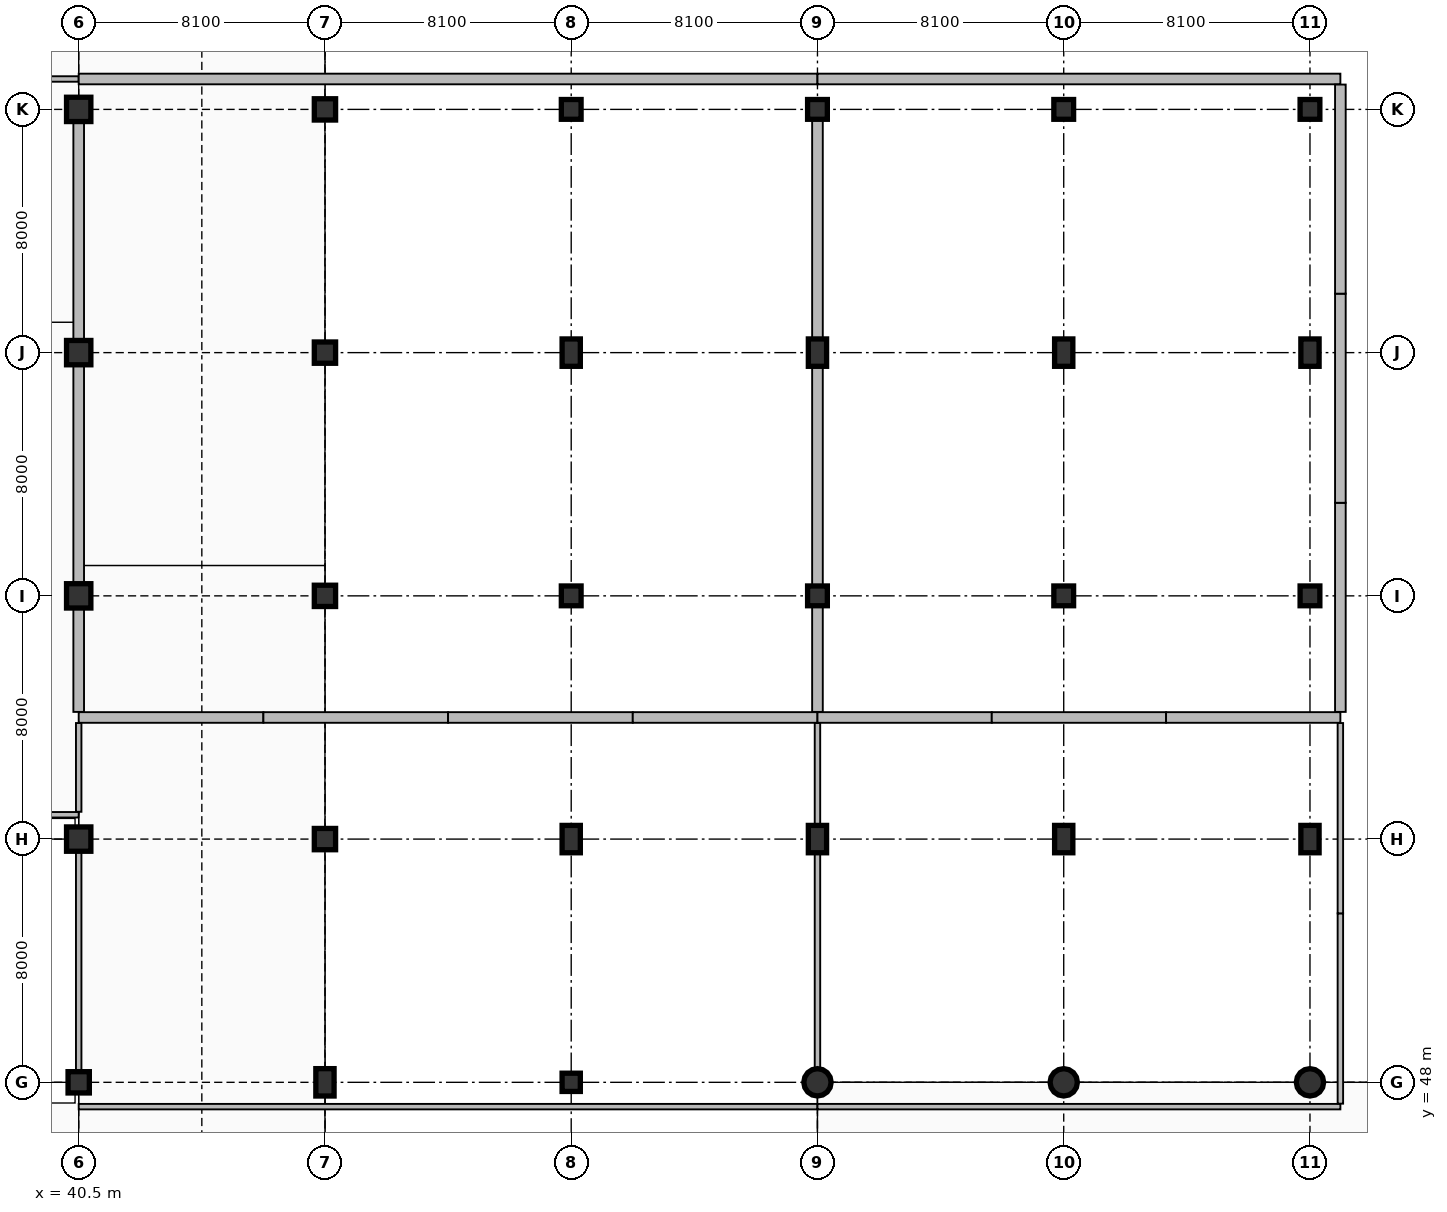
"""IFC4 building model, lengths in metres.
Left out: names, types, materials, properties, quantities, classifications, styles, units other than length and angle.
Written with IfcOpenShell. Run it as: python <this file> out.ifc"""

import sys

from ifc_helpers import new_model, si_unit, direction, frame, frame_2d, origin, origin_2d, place, context, subcontext, project, spatial, rectangle, circle, extrude, element, fill, save


model = new_model("IFC4")
c1 = context("Model", 3, precision=1e-05, world=origin(), true_north=direction((0.0, 1.0)))
c2 = subcontext(c1, "Body", "Model", "MODEL_VIEW")
j1 = project(units=[si_unit("LENGTHUNIT", "METRE"), si_unit("PLANEANGLEUNIT", "RADIAN")], contexts=[c1])
p1 = place(None, origin())
s1 = spatial("IfcSite", under=j1, at=p1, CompositionType="ELEMENT")
p2 = place(p1, origin())
s2 = spatial("IfcBuilding", under=s1, at=p2, CompositionType="ELEMENT")
p3 = place(p2, frame((0.0, 0.0, -4.8)))
s3 = spatial("IfcBuildingStorey", under=s2, at=p3, CompositionType="ELEMENT", Elevation=-4.8)
p4 = place(p3, frame((40.5, 48.0, 0.0), z_axis=(0.0, 0.0, 1.0), x_axis=(1.0, 0.0, 0.0)))
e1 = element("IfcColumn", 1, at=p4, inside=s3, PredefinedType="COLUMN", context=c2, shape_type="SweptSolid", body=[
    extrude(rectangle(XDim=0.7, YDim=0.7, at=origin_2d()), origin(), (0.0, 0.0, 1.0), 4.8),
])
for number, where, z_axis, x_axis in (
    (2, (40.5, 56.0, 0.0), (0.0, 0.0, 1.0), (1.0, 0.0, 0.0)),
    (3, (40.5, 64.0, 0.0), (0.0, 0.0, 1.0), (1.0, 0.0, 0.0)),
    (4, (40.5, 72.0, 0.0), (0.0, 0.0, 1.0), (1.0, 0.0, 0.0)),
    (5, (40.5, 80.0, 0.0), (0.0, 0.0, 1.0), (1.0, 0.0, 0.0)),
):
    element("IfcColumn", number, at=place(p3, frame(where, z_axis=z_axis, x_axis=x_axis)), inside=s3, PredefinedType="COLUMN", context=c2, shape_type="SweptSolid", body=[
        extrude(rectangle(XDim=0.8, YDim=0.8, at=origin_2d()), origin(), (0.0, 0.0, 1.0), 4.8),
    ])
p5 = place(p3, frame((48.6, 48.0, 0.0), z_axis=(0.0, 0.0, 1.0), x_axis=(1.0, 0.0, 0.0)))
e6 = element("IfcColumn", 6, at=p5, inside=s3, PredefinedType="COLUMN", context=c2, shape_type="SweptSolid", body=[
    extrude(rectangle(XDim=0.6, YDim=0.9, at=origin_2d()), origin(), (0.0, 0.0, 1.0), 4.8),
])
for number, where, z_axis, x_axis in (
    (7, (48.6, 56.0, 0.0), (0.0, 0.0, 1.0), (1.0, 0.0, 0.0)),
    (8, (48.6, 64.0, 0.0), (0.0, 0.0, 1.0), (1.0, 0.0, 0.0)),
    (9, (48.6, 72.0, 0.0), (0.0, 0.0, 1.0), (1.0, 0.0, 0.0)),
    (10, (48.6, 80.0, 0.0), (0.0, 0.0, 1.0), (1.0, 0.0, 0.0)),
):
    element("IfcColumn", number, at=place(p3, frame(where, z_axis=z_axis, x_axis=x_axis)), inside=s3, PredefinedType="COLUMN", context=c2, shape_type="SweptSolid", body=[
        extrude(rectangle(XDim=0.7, YDim=0.7, at=origin_2d()), origin(), (0.0, 0.0, 1.0), 4.8),
    ])
p6 = place(p3, frame((56.7, 48.0, 0.0), z_axis=(0.0, 0.0, 1.0), x_axis=(1.0, 0.0, 0.0)))
e11 = element("IfcColumn", 11, at=p6, inside=s3, PredefinedType="COLUMN", context=c2, shape_type="SweptSolid", body=[
    extrude(rectangle(XDim=0.6, YDim=0.6, at=origin_2d()), origin(), (0.0, 0.0, 1.0), 4.45),
])
p7 = place(p3, frame((56.7, 56.0, 0.0), z_axis=(0.0, 0.0, 1.0), x_axis=(1.0, 0.0, 0.0)))
e12 = element("IfcColumn", 12, at=p7, inside=s3, PredefinedType="COLUMN", context=c2, shape_type="SweptSolid", body=[
    extrude(rectangle(XDim=0.6, YDim=0.9, at=origin_2d()), origin(), (0.0, 0.0, 1.0), 4.8),
])
p8 = place(p3, frame((56.7, 64.0, 0.0), z_axis=(0.0, 0.0, 1.0), x_axis=(1.0, 0.0, 0.0)))
e13 = element("IfcColumn", 13, at=p8, inside=s3, PredefinedType="COLUMN", context=c2, shape_type="SweptSolid", body=[
    extrude(rectangle(XDim=0.65, YDim=0.65, at=origin_2d()), origin(), (0.0, 0.0, 1.0), 4.8),
])
p9 = place(p3, frame((56.7, 72.0, 0.0), z_axis=(0.0, 0.0, 1.0), x_axis=(1.0, 0.0, 0.0)))
e14 = element("IfcColumn", 14, at=p9, inside=s3, PredefinedType="COLUMN", context=c2, shape_type="SweptSolid", body=[
    extrude(rectangle(XDim=0.6, YDim=0.9, at=origin_2d()), origin(), (0.0, 0.0, 1.0), 4.8),
])
p10 = place(p3, frame((56.7, 80.0, 0.0), z_axis=(0.0, 0.0, 1.0), x_axis=(1.0, 0.0, 0.0)))
e15 = element("IfcColumn", 15, at=p10, inside=s3, PredefinedType="COLUMN", context=c2, shape_type="SweptSolid", body=[
    extrude(rectangle(XDim=0.65, YDim=0.65, at=origin_2d()), origin(), (0.0, 0.0, 1.0), 4.8),
])
p11 = place(p3, frame((64.8, 48.0, 0.0), z_axis=(0.0, 0.0, 1.0), x_axis=(1.0, 0.0, 0.0)))
e16 = element("IfcColumn", 16, at=p11, inside=s3, PredefinedType="COLUMN", context=c2, shape_type="SweptSolid", body=[
    extrude(circle(Radius=0.45, at=origin_2d()), origin(), (0.0, 0.0, 1.0), 4.8),
])
p12 = place(p3, frame((64.8, 56.0, 0.0), z_axis=(0.0, 0.0, 1.0), x_axis=(1.0, 0.0, 0.0)))
e17 = element("IfcColumn", 17, at=p12, inside=s3, PredefinedType="COLUMN", context=c2, shape_type="SweptSolid", body=[
    extrude(rectangle(XDim=0.6, YDim=0.9, at=origin_2d()), origin(), (0.0, 0.0, 1.0), 4.8),
])
p13 = place(p3, frame((64.8, 64.0, 0.0), z_axis=(0.0, 0.0, 1.0), x_axis=(1.0, 0.0, 0.0)))
e18 = element("IfcColumn", 18, at=p13, inside=s3, PredefinedType="COLUMN", context=c2, shape_type="SweptSolid", body=[
    extrude(rectangle(XDim=0.65, YDim=0.65, at=origin_2d()), origin(), (0.0, 0.0, 1.0), 4.8),
])
p14 = place(p3, frame((64.8, 72.0, 0.0), z_axis=(0.0, 0.0, 1.0), x_axis=(1.0, 0.0, 0.0)))
e19 = element("IfcColumn", 19, at=p14, inside=s3, PredefinedType="COLUMN", context=c2, shape_type="SweptSolid", body=[
    extrude(rectangle(XDim=0.6, YDim=0.9, at=origin_2d()), origin(), (0.0, 0.0, 1.0), 4.8),
])
p15 = place(p3, frame((64.8, 80.0, 0.0), z_axis=(0.0, 0.0, 1.0), x_axis=(1.0, 0.0, 0.0)))
e20 = element("IfcColumn", 20, at=p15, inside=s3, PredefinedType="COLUMN", context=c2, shape_type="SweptSolid", body=[
    extrude(rectangle(XDim=0.65, YDim=0.65, at=origin_2d()), origin(), (0.0, 0.0, 1.0), 4.8),
])
p16 = place(p3, frame((72.9, 48.0, 0.0), z_axis=(0.0, 0.0, 1.0), x_axis=(1.0, 0.0, 0.0)))
e21 = element("IfcColumn", 21, at=p16, inside=s3, PredefinedType="COLUMN", context=c2, shape_type="SweptSolid", body=[
    extrude(circle(Radius=0.45, at=origin_2d()), origin(), (0.0, 0.0, 1.0), 4.8),
])
p17 = place(p3, frame((72.9, 56.0, 0.0), z_axis=(0.0, 0.0, 1.0), x_axis=(1.0, 0.0, 0.0)))
e22 = element("IfcColumn", 22, at=p17, inside=s3, PredefinedType="COLUMN", context=c2, shape_type="SweptSolid", body=[
    extrude(rectangle(XDim=0.6, YDim=0.9, at=origin_2d()), origin(), (0.0, 0.0, 1.0), 4.8),
])
p18 = place(p3, frame((72.9, 64.0, 0.0), z_axis=(0.0, 0.0, 1.0), x_axis=(1.0, 0.0, 0.0)))
e23 = element("IfcColumn", 23, at=p18, inside=s3, PredefinedType="COLUMN", context=c2, shape_type="SweptSolid", body=[
    extrude(rectangle(XDim=0.65, YDim=0.65, at=origin_2d()), origin(), (0.0, 0.0, 1.0), 4.8),
])
p19 = place(p3, frame((72.9, 72.0, 0.0), z_axis=(0.0, 0.0, 1.0), x_axis=(1.0, 0.0, 0.0)))
e24 = element("IfcColumn", 24, at=p19, inside=s3, PredefinedType="COLUMN", context=c2, shape_type="SweptSolid", body=[
    extrude(rectangle(XDim=0.6, YDim=0.9, at=origin_2d()), origin(), (0.0, 0.0, 1.0), 4.8),
])
p20 = place(p3, frame((72.9, 80.0, 0.0), z_axis=(0.0, 0.0, 1.0), x_axis=(1.0, 0.0, 0.0)))
e25 = element("IfcColumn", 25, at=p20, inside=s3, PredefinedType="COLUMN", context=c2, shape_type="SweptSolid", body=[
    extrude(rectangle(XDim=0.65, YDim=0.65, at=origin_2d()), origin(), (0.0, 0.0, 1.0), 4.8),
])
p21 = place(p3, frame((81.0, 48.0, 0.0), z_axis=(0.0, 0.0, 1.0), x_axis=(1.0, 0.0, 0.0)))
e26 = element("IfcColumn", 26, at=p21, inside=s3, PredefinedType="COLUMN", context=c2, shape_type="SweptSolid", body=[
    extrude(circle(Radius=0.45, at=origin_2d()), origin(), (0.0, 0.0, 1.0), 4.8),
])
p22 = place(p3, frame((81.0, 56.0, 0.0), z_axis=(0.0, 0.0, 1.0), x_axis=(1.0, 0.0, 0.0)))
e27 = element("IfcColumn", 27, at=p22, inside=s3, PredefinedType="COLUMN", context=c2, shape_type="SweptSolid", body=[
    extrude(rectangle(XDim=0.6, YDim=0.9, at=origin_2d()), origin(), (0.0, 0.0, 1.0), 4.8),
])
p23 = place(p3, frame((81.0, 64.0, 0.0), z_axis=(0.0, 0.0, 1.0), x_axis=(1.0, 0.0, 0.0)))
e28 = element("IfcColumn", 28, at=p23, inside=s3, PredefinedType="COLUMN", context=c2, shape_type="SweptSolid", body=[
    extrude(rectangle(XDim=0.65, YDim=0.65, at=origin_2d()), origin(), (0.0, 0.0, 1.0), 4.8),
])
p24 = place(p3, frame((81.0, 72.0, 0.0), z_axis=(0.0, 0.0, 1.0), x_axis=(1.0, 0.0, 0.0)))
e29 = element("IfcColumn", 29, at=p24, inside=s3, PredefinedType="COLUMN", context=c2, shape_type="SweptSolid", body=[
    extrude(rectangle(XDim=0.6, YDim=0.9, at=origin_2d()), origin(), (0.0, 0.0, 1.0), 4.8),
])
p25 = place(p3, frame((81.0, 80.0, 0.0), z_axis=(0.0, 0.0, 1.0), x_axis=(1.0, 0.0, 0.0)))
e30 = element("IfcColumn", 30, at=p25, inside=s3, PredefinedType="COLUMN", context=c2, shape_type="SweptSolid", body=[
    extrude(rectangle(XDim=0.65, YDim=0.65, at=origin_2d()), origin(), (0.0, 0.0, 1.0), 4.8),
])
p26 = place(p3, frame((36.2, 56.8, 0.0), z_axis=(0.0, 0.0, 1.0), x_axis=(1.0, 0.0, 0.0)))
e31 = element("IfcWall", 31, at=p26, inside=s3, PredefinedType="PARTITIONING", context=c2, shape_type="SweptSolid", body=[
    extrude(rectangle(XDim=4.3, YDim=0.18, at=frame_2d((2.15, 0.0))), origin(), (0.0, 0.0, 1.0), 4.45),
])
p27 = place(p3, frame((36.2, 81.0, 0.0), z_axis=(0.0, 0.0, 1.0), x_axis=(1.0, 0.0, 0.0)))
e32 = element("IfcWall", 32, at=p27, inside=s3, PredefinedType="PARTITIONING", context=c2, shape_type="SweptSolid", body=[
    extrude(rectangle(XDim=4.3, YDim=0.18, at=frame_2d((2.15, 0.0))), origin(), (0.0, 0.0, 1.0), 4.45),
])
p28 = place(p27, frame((1.55, 0.0, 0.0)))
e33 = element("IfcOpeningElement", 33, at=p28, cuts=e32, PredefinedType="OPENING", context=c2, shape_type="SweptSolid", body=[
    extrude(rectangle(XDim=1.2, YDim=2.2, at=frame_2d((0.6, 1.1))), frame((0.0, 0.1, 0.0), z_axis=(0.0, -1.0, 0.0), x_axis=(1.0, 0.0, 0.0)), (0.0, 0.0, 1.0), 0.2),
])
p29 = place(p3, frame((40.5, 47.2, 0.0), z_axis=(0.0, 0.0, 1.0), x_axis=(1.0, 0.0, 0.0)))
e34 = element("IfcWall", 34, at=p29, inside=s3, PredefinedType="PARTITIONING", context=c2, shape_type="SweptSolid", body=[
    extrude(rectangle(XDim=24.3, YDim=0.18, at=frame_2d((12.15, 0.0))), origin(), (0.0, 0.0, 1.0), 4.45),
])
p30 = place(p29, frame((11.55, 0.0, 0.0)))
e35 = element("IfcOpeningElement", 35, at=p30, cuts=e34, PredefinedType="OPENING", context=c2, shape_type="SweptSolid", body=[
    extrude(rectangle(XDim=1.2, YDim=2.2, at=frame_2d((0.6, 1.1))), frame((0.0, 0.1, 0.0), z_axis=(0.0, -1.0, 0.0), x_axis=(1.0, 0.0, 0.0)), (0.0, 0.0, 1.0), 0.2),
])
for number, where, z_axis, x_axis in (
    (36, (40.5, 60.0, 0.0), (0.0, 0.0, 1.0), (1.0, 0.0, 0.0)),
    (37, (46.575, 60.0, 0.0), (0.0, 0.0, 1.0), (1.0, 0.0, 0.0)),
):
    element("IfcWall", number, at=place(p3, frame(where, z_axis=z_axis, x_axis=x_axis)), inside=s3, PredefinedType="SOLIDWALL", context=c2, shape_type="SweptSolid", body=[
        extrude(rectangle(XDim=6.075, YDim=0.35, at=frame_2d((3.038, 0.0))), origin(), (0.0, 0.0, 1.0), 4.45),
    ])
p31 = place(p3, frame((52.65, 60.0, 0.0), z_axis=(0.0, 0.0, 1.0), x_axis=(1.0, 0.0, 0.0)))
e38 = element("IfcWall", 38, at=p31, inside=s3, PredefinedType="SOLIDWALL", context=c2, shape_type="SweptSolid", body=[
    extrude(rectangle(XDim=6.075, YDim=0.35, at=frame_2d((3.038, 0.0))), origin(), (0.0, 0.0, 1.0), 4.45),
])
p32 = place(p3, frame((58.725, 60.0, 0.0), z_axis=(0.0, 0.0, 1.0), x_axis=(1.0, 0.0, 0.0)))
e39 = element("IfcWall", 39, at=p32, inside=s3, PredefinedType="SOLIDWALL", context=c2, shape_type="SweptSolid", body=[
    extrude(rectangle(XDim=6.075, YDim=0.35, at=frame_2d((3.038, 0.0))), origin(), (0.0, 0.0, 1.0), 4.45),
])
p33 = place(p3, frame((40.5, 81.0, 0.0), z_axis=(0.0, 0.0, 1.0), x_axis=(1.0, 0.0, 0.0)))
e40 = element("IfcWall", 40, at=p33, inside=s3, PredefinedType="SOLIDWALL", context=c2, shape_type="SweptSolid", body=[
    extrude(rectangle(XDim=24.3, YDim=0.35, at=frame_2d((12.15, 0.0))), origin(), (0.0, 0.0, 1.0), 4.45),
])
p34 = place(p33, frame((11.6, 0.0, 0.0)))
e41 = element("IfcOpeningElement", 41, at=p34, cuts=e40, PredefinedType="OPENING", context=c2, shape_type="SweptSolid", body=[
    extrude(rectangle(XDim=1.1, YDim=2.25, at=frame_2d((0.55, 1.125))), frame((0.0, 0.185, 0.0), z_axis=(0.0, -1.0, 0.0), x_axis=(1.0, 0.0, 0.0)), (0.0, 0.0, 1.0), 0.37),
])
p35 = place(p3, frame((64.8, 47.2, 0.0), z_axis=(0.0, 0.0, 1.0), x_axis=(1.0, 0.0, 0.0)))
e42 = element("IfcWall", 42, at=p35, inside=s3, PredefinedType="PARTITIONING", context=c2, shape_type="SweptSolid", body=[
    extrude(rectangle(XDim=17.2, YDim=0.18, at=frame_2d((8.6, 0.0))), origin(), (0.0, 0.0, 1.0), 4.45),
])
p36 = place(p35, frame((5.248, 0.0, 0.0)))
e43 = element("IfcOpeningElement", 43, at=p36, cuts=e42, PredefinedType="OPENING", context=c2, shape_type="SweptSolid", body=[
    extrude(rectangle(XDim=1.2, YDim=2.2, at=frame_2d((0.6, 1.1))), frame((0.0, 0.1, 0.0), z_axis=(0.0, -1.0, 0.0), x_axis=(1.0, 0.0, 0.0)), (0.0, 0.0, 1.0), 0.2),
])
p37 = place(p3, frame((64.8, 60.0, 0.0), z_axis=(0.0, 0.0, 1.0), x_axis=(1.0, 0.0, 0.0)))
e44 = element("IfcWall", 44, at=p37, inside=s3, PredefinedType="SOLIDWALL", context=c2, shape_type="SweptSolid", body=[
    extrude(rectangle(XDim=5.733, YDim=0.35, at=frame_2d((2.867, 0.0))), origin(), (0.0, 0.0, 1.0), 4.45),
])
p38 = place(p3, frame((70.533, 60.0, 0.0), z_axis=(0.0, 0.0, 1.0), x_axis=(1.0, 0.0, 0.0)))
e45 = element("IfcWall", 45, at=p38, inside=s3, PredefinedType="SOLIDWALL", context=c2, shape_type="SweptSolid", body=[
    extrude(rectangle(XDim=5.733, YDim=0.35, at=frame_2d((2.867, 0.0))), origin(), (0.0, 0.0, 1.0), 4.45),
])
p39 = place(p3, frame((76.267, 60.0, 0.0), z_axis=(0.0, 0.0, 1.0), x_axis=(1.0, 0.0, 0.0)))
e46 = element("IfcWall", 46, at=p39, inside=s3, PredefinedType="SOLIDWALL", context=c2, shape_type="SweptSolid", body=[
    extrude(rectangle(XDim=5.733, YDim=0.35, at=frame_2d((2.867, 0.0))), origin(), (0.0, 0.0, 1.0), 4.45),
])
p40 = place(p3, frame((64.8, 81.0, 0.0), z_axis=(0.0, 0.0, 1.0), x_axis=(1.0, 0.0, 0.0)))
e47 = element("IfcWall", 47, at=p40, inside=s3, PredefinedType="SOLIDWALL", context=c2, shape_type="SweptSolid", body=[
    extrude(rectangle(XDim=17.2, YDim=0.35, at=frame_2d((8.6, 0.0))), origin(), (0.0, 0.0, 1.0), 4.45),
])
p41 = place(p40, frame((5.298, 0.0, 0.0)))
e48 = element("IfcOpeningElement", 48, at=p41, cuts=e47, PredefinedType="OPENING", context=c2, shape_type="SweptSolid", body=[
    extrude(rectangle(XDim=1.1, YDim=2.25, at=frame_2d((0.55, 1.125))), frame((0.0, 0.185, 0.0), z_axis=(0.0, -1.0, 0.0), x_axis=(1.0, 0.0, 0.0)), (0.0, 0.0, 1.0), 0.37),
])
p42 = place(p3, frame((40.5, 48.358, 0.0), z_axis=(0.0, 0.0, 1.0), x_axis=(0.0, 1.0, 0.0)))
e49 = element("IfcWall", 49, at=p42, inside=s3, PredefinedType="PARTITIONING", context=c2, shape_type="SweptSolid", body=[
    extrude(rectangle(XDim=7.234, YDim=0.18, at=frame_2d((3.617, 0.0))), origin(), (0.0, 0.0, 1.0), 3.692),
])
p43 = place(p3, frame((40.5, 56.898, 0.0), z_axis=(0.0, 0.0, 1.0), x_axis=(0.0, 1.0, 0.0)))
e50 = element("IfcWall", 50, at=p43, inside=s3, PredefinedType="PARTITIONING", context=c2, shape_type="SweptSolid", body=[
    extrude(rectangle(XDim=2.919, YDim=0.18, at=frame_2d((1.459, 0.0))), origin(), (0.0, 0.0, 1.0), 3.692),
])
p44 = place(p3, frame((40.5, 60.183, 0.0), z_axis=(0.0, 0.0, 1.0), x_axis=(0.0, 1.0, 0.0)))
e51 = element("IfcWall", 51, at=p44, inside=s3, PredefinedType="SOLIDWALL", context=c2, shape_type="SweptSolid", body=[
    extrude(rectangle(XDim=3.409, YDim=0.35, at=frame_2d((1.705, 0.0))), origin(), (0.0, 0.0, 1.0), 3.692),
])
for number, where, z_axis, x_axis in (
    (52, (40.5, 64.408, 0.0), (0.0, 0.0, 1.0), (0.0, 1.0, 0.0)),
    (53, (40.5, 72.408, 0.0), (0.0, 0.0, 1.0), (0.0, 1.0, 0.0)),
):
    element("IfcWall", number, at=place(p3, frame(where, z_axis=z_axis, x_axis=x_axis)), inside=s3, PredefinedType="SOLIDWALL", context=c2, shape_type="SweptSolid", body=[
        extrude(rectangle(XDim=7.184, YDim=0.35, at=frame_2d((3.592, 0.0))), origin(), (0.0, 0.0, 1.0), 3.692),
    ])
p45 = place(p3, frame((64.8, 48.458, 0.0), z_axis=(0.0, 0.0, 1.0), x_axis=(0.0, 1.0, 0.0)))
e54 = element("IfcWall", 54, at=p45, inside=s3, PredefinedType="PARTITIONING", context=c2, shape_type="SweptSolid", body=[
    extrude(rectangle(XDim=7.084, YDim=0.18, at=frame_2d((3.542, 0.0))), origin(), (0.0, 0.0, 1.0), 4.45),
])
p46 = place(p3, frame((64.8, 56.458, 0.0), z_axis=(0.0, 0.0, 1.0), x_axis=(0.0, 1.0, 0.0)))
e55 = element("IfcWall", 55, at=p46, inside=s3, PredefinedType="PARTITIONING", context=c2, shape_type="SweptSolid", body=[
    extrude(rectangle(XDim=3.359, YDim=0.18, at=frame_2d((1.679, 0.0))), origin(), (0.0, 0.0, 1.0), 4.45),
])
p47 = place(p3, frame((64.8, 60.183, 0.0), z_axis=(0.0, 0.0, 1.0), x_axis=(0.0, 1.0, 0.0)))
e56 = element("IfcWall", 56, at=p47, inside=s3, PredefinedType="SOLIDWALL", context=c2, shape_type="SweptSolid", body=[
    extrude(rectangle(XDim=3.484, YDim=0.35, at=frame_2d((1.742, 0.0))), origin(), (0.0, 0.0, 1.0), 4.45),
])
for number, where, z_axis, x_axis in (
    (57, (64.8, 64.333, 0.0), (0.0, 0.0, 1.0), (0.0, 1.0, 0.0)),
    (58, (64.8, 72.458, 0.0), (0.0, 0.0, 1.0), (0.0, 1.0, 0.0)),
):
    element("IfcWall", number, at=place(p3, frame(where, z_axis=z_axis, x_axis=x_axis)), inside=s3, PredefinedType="SOLIDWALL", context=c2, shape_type="SweptSolid", body=[
        extrude(rectangle(XDim=7.209, YDim=0.35, at=frame_2d((3.604, 0.0))), origin(), (0.0, 0.0, 1.0), 4.45),
    ])
p48 = place(p3, frame((82.0, 47.298, 0.0), z_axis=(0.0, 0.0, 1.0), x_axis=(0.0, 1.0, 0.0)))
e59 = element("IfcWall", 59, at=p48, inside=s3, PredefinedType="PARTITIONING", context=c2, shape_type="SweptSolid", body=[
    extrude(rectangle(XDim=6.26, YDim=0.18, at=frame_2d((3.13, 0.0))), origin(), (0.0, 0.0, 1.0), 4.45),
])
p49 = place(p3, frame((82.0, 53.558, 0.0), z_axis=(0.0, 0.0, 1.0), x_axis=(0.0, 1.0, 0.0)))
e60 = element("IfcWall", 60, at=p49, inside=s3, PredefinedType="PARTITIONING", context=c2, shape_type="SweptSolid", body=[
    extrude(rectangle(XDim=6.259, YDim=0.18, at=frame_2d((3.13, 0.0))), origin(), (0.0, 0.0, 1.0), 4.45),
])
for number, where, z_axis, x_axis in (
    (61, (82.0, 60.183, 0.0), (0.0, 0.0, 1.0), (0.0, 1.0, 0.0)),
    (62, (82.0, 67.061, 0.0), (0.0, 0.0, 1.0), (0.0, 1.0, 0.0)),
    (63, (82.0, 73.939, 0.0), (0.0, 0.0, 1.0), (0.0, 1.0, 0.0)),
):
    element("IfcWall", number, at=place(p3, frame(where, z_axis=z_axis, x_axis=x_axis)), inside=s3, PredefinedType="SOLIDWALL", context=c2, shape_type="SweptSolid", body=[
        extrude(rectangle(XDim=6.878, YDim=0.35, at=frame_2d((3.439, 0.0))), origin(), (0.0, 0.0, 1.0), 4.45),
    ])
p50 = place(p30, origin())
e64 = element("IfcDoor", 64, at=p50, inside=s3, OperationType="SINGLE_SWING_RIGHT", PredefinedType="DOOR", context=c2, shape_type="SweptSolid", body=[
    extrude(rectangle(XDim=1.2, YDim=2.2, at=frame_2d((0.6, 1.1))), frame((0.0, 0.025, 0.0), z_axis=(0.0, -1.0, 0.0), x_axis=(1.0, 0.0, 0.0)), (0.0, 0.0, 1.0), 0.05),
])
fill(e35, e64)
p51 = place(p34, frame((1.1, 0.0, 0.0), z_axis=(0.0, 0.0, 1.0), x_axis=(-1.0, 0.0, 0.0)))
e65 = element("IfcDoor", 65, at=p51, inside=s3, OperationType="SINGLE_SWING_LEFT", PredefinedType="DOOR", context=c2, shape_type="SweptSolid", body=[
    extrude(rectangle(XDim=1.1, YDim=2.25, at=frame_2d((0.55, 1.125))), frame((0.0, 0.025, 0.0), z_axis=(0.0, -1.0, 0.0), x_axis=(1.0, 0.0, 0.0)), (0.0, 0.0, 1.0), 0.05),
])
fill(e41, e65)
p52 = place(p36, origin())
e66 = element("IfcDoor", 66, at=p52, inside=s3, OperationType="SINGLE_SWING_LEFT", PredefinedType="DOOR", context=c2, shape_type="SweptSolid", body=[
    extrude(rectangle(XDim=1.2, YDim=2.2, at=frame_2d((0.6, 1.1))), frame((0.0, 0.025, 0.0), z_axis=(0.0, -1.0, 0.0), x_axis=(1.0, 0.0, 0.0)), (0.0, 0.0, 1.0), 0.05),
])
fill(e43, e66)
p53 = place(p41, frame((1.1, 0.0, 0.0), z_axis=(0.0, 0.0, 1.0), x_axis=(-1.0, 0.0, 0.0)))
e67 = element("IfcDoor", 67, at=p53, inside=s3, OperationType="SINGLE_SWING_RIGHT", PredefinedType="DOOR", context=c2, shape_type="SweptSolid", body=[
    extrude(rectangle(XDim=1.1, YDim=2.25, at=frame_2d((0.55, 1.125))), frame((0.0, 0.025, 0.0), z_axis=(0.0, -1.0, 0.0), x_axis=(1.0, 0.0, 0.0)), (0.0, 0.0, 1.0), 0.05),
])
fill(e48, e67)
save(model, sys.argv[1])
